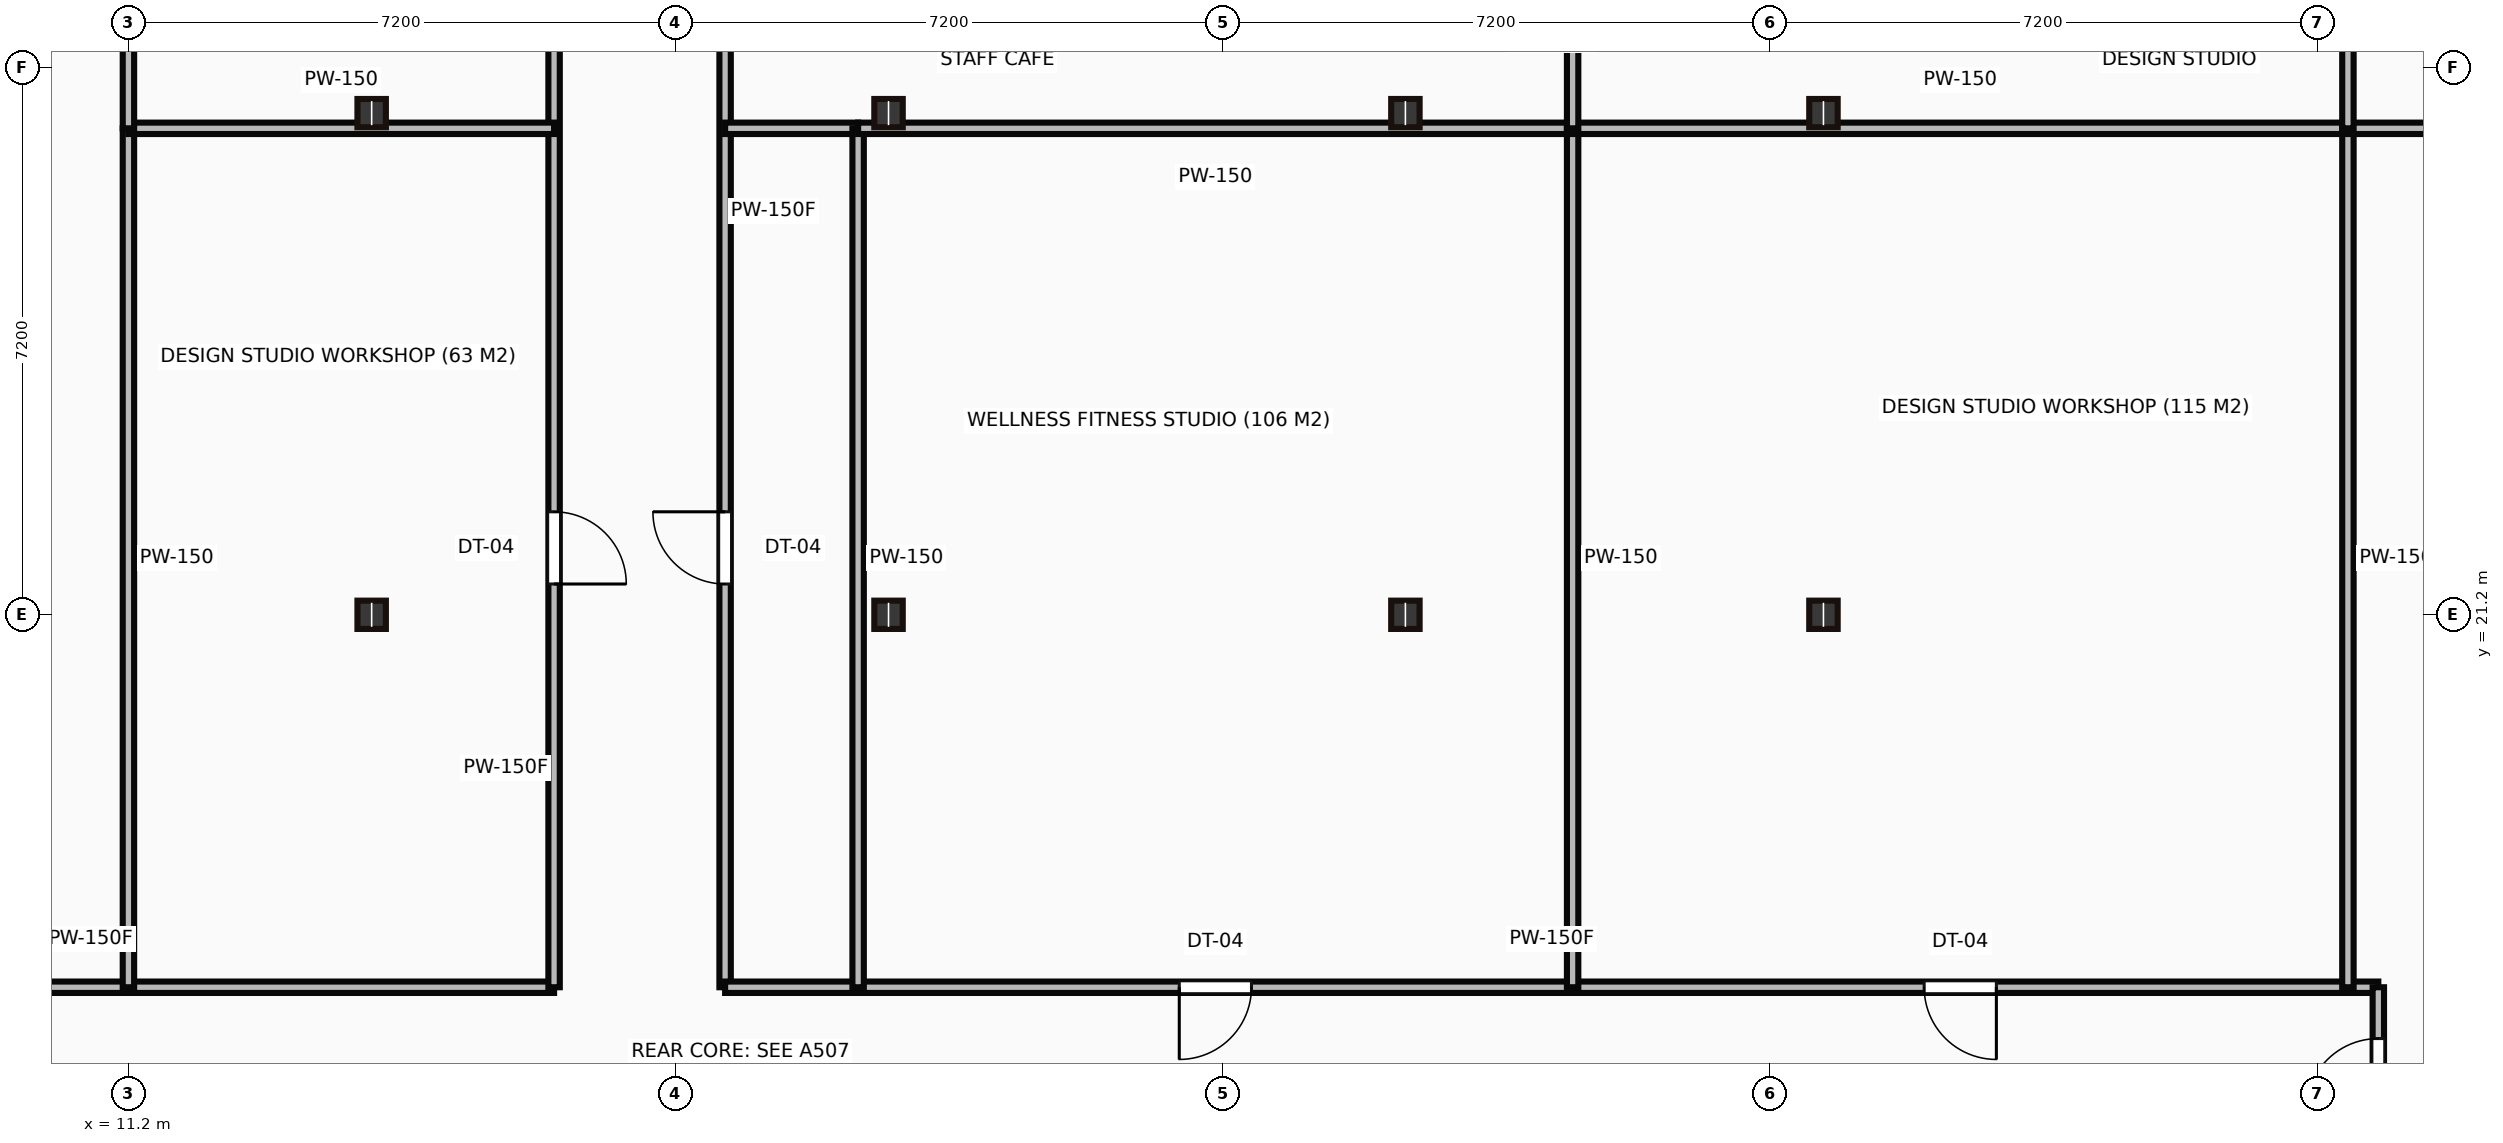
"""IFC4 building model, lengths in metres.
Left out: names, types, materials, properties, quantities, classifications, styles, units other than length and angle.
Written with IfcOpenShell. Run it as: python <this file> out.ifc"""

import sys

from ifc_helpers import new_model, si_unit, direction, frame, frame_2d, origin, origin_2d, place, context, subcontext, project, spatial, rectangle, i_section, extrude, source, transform, mapped, element, fill, save


model = new_model("IFC4")
c1 = context("Model", 3, precision=1e-05, world=origin(), true_north=direction((0.0, 1.0)))
c2 = subcontext(c1, "Body", "Model", "MODEL_VIEW")
j1 = project(units=[si_unit("LENGTHUNIT", "METRE"), si_unit("PLANEANGLEUNIT", "RADIAN")], contexts=[c1])
p1 = place(None, origin())
s1 = spatial("IfcSite", under=j1, at=p1, CompositionType="ELEMENT")
p2 = place(p1, origin())
s2 = spatial("IfcBuilding", under=s1, at=p2, CompositionType="ELEMENT")
p3 = place(p2, frame((0.0, 0.0, 173.45)))
s3 = spatial("IfcBuildingStorey", under=s2, at=p3, CompositionType="ELEMENT", Elevation=173.45)
m1 = source(origin(), c2, "Body", "SweptSolid", [
    extrude(i_section(OverallWidth=0.374, OverallDepth=0.372, WebThickness=0.016, FlangeThickness=0.026, at=origin_2d()), origin(), (0.0, 0.0, 1.0), 3.65),
])
for number, where, z_axis, x_axis in (
    (1, (14.4, 21.2, 0.0), (0.0, 0.0, 1.0), (1.0, 0.0, 0.0)),
    (2, (14.4, 27.8, 0.0), (0.0, 0.0, 1.0), (1.0, 0.0, 0.0)),
    (3, (21.2, 21.2, 0.0), (0.0, 0.0, 1.0), (1.0, 0.0, 0.0)),
    (4, (21.2, 27.8, 0.0), (0.0, 0.0, 1.0), (1.0, 0.0, 0.0)),
    (5, (28.0, 21.2, 0.0), (0.0, 0.0, 1.0), (1.0, 0.0, 0.0)),
    (6, (28.0, 27.8, 0.0), (0.0, 0.0, 1.0), (1.0, 0.0, 0.0)),
    (7, (33.5, 21.2, 0.0), (0.0, 0.0, 1.0), (1.0, 0.0, 0.0)),
    (8, (33.5, 27.8, 0.0), (0.0, 0.0, 1.0), (1.0, 0.0, 0.0)),
):
    element("IfcColumn", number, at=place(p3, frame(where, z_axis=z_axis, x_axis=x_axis)), inside=s3, PredefinedType="COLUMN", context=c2, shape_type="MappedRepresentation", body=[
        mapped(m1, transform((0.0, 0.0, 0.0))),
    ])
m2 = source(origin(), c2, "Body", "SweptSolid", [
    extrude(rectangle(XDim=12.2, YDim=0.15, at=frame_2d((6.1, 0.0))), origin(), (0.0, 0.0, 1.0), 3.4),
])
p4 = place(p3, frame((4.6, 16.3, 0.0), z_axis=(0.0, 0.0, 1.0), x_axis=(1.0, 0.0, 0.0)))
e9 = element("IfcWall", 9, at=p4, inside=s3, PredefinedType="PARTITIONING", context=c2, shape_type="MappedRepresentation", body=[
    mapped(m2, transform((0.0, 0.0, 0.0))),
])
p5 = place(p4, frame((2.955, 0.0, 0.0)))
e10 = element("IfcOpeningElement", 10, at=p5, cuts=e9, PredefinedType="OPENING", context=c2, shape_type="SweptSolid", body=[
    extrude(rectangle(XDim=0.95, YDim=2.15, at=frame_2d((0.475, 1.075))), frame((0.0, 0.085, 0.0), z_axis=(0.0, -1.0, 0.0), x_axis=(1.0, 0.0, 0.0)), (0.0, 0.0, 1.0), 0.17),
])
m3 = source(origin(), c2, "Body", "SweptSolid", [
    extrude(rectangle(XDim=13.1, YDim=0.15, at=frame_2d((6.55, 0.0))), origin(), (0.0, 0.0, 1.0), 3.4),
])
p6 = place(p3, frame((16.8, 16.3, 0.0), z_axis=(0.0, 0.0, 1.0), x_axis=(0.0, 1.0, 0.0)))
e11 = element("IfcWall", 11, at=p6, inside=s3, PredefinedType="PARTITIONING", context=c2, shape_type="MappedRepresentation", body=[
    mapped(m3, transform((0.0, 0.0, 0.0))),
])
p7 = place(p6, frame((5.305, 0.0, 0.0)))
e12 = element("IfcOpeningElement", 12, at=p7, cuts=e11, PredefinedType="OPENING", context=c2, shape_type="SweptSolid", body=[
    extrude(rectangle(XDim=0.95, YDim=2.15, at=frame_2d((0.475, 1.075))), frame((0.0, 0.085, 0.0), z_axis=(0.0, -1.0, 0.0), x_axis=(1.0, 0.0, 0.0)), (0.0, 0.0, 1.0), 0.17),
])
p8 = place(p3, frame((19.05, 29.4, 0.0), z_axis=(0.0, 0.0, 1.0), x_axis=(0.0, -1.0, 0.0)))
e13 = element("IfcWall", 13, at=p8, inside=s3, PredefinedType="PARTITIONING", context=c2, shape_type="MappedRepresentation", body=[
    mapped(m3, transform((0.0, 0.0, 0.0))),
])
p9 = place(p8, frame((6.845, 0.0, 0.0)))
e14 = element("IfcOpeningElement", 14, at=p9, cuts=e13, PredefinedType="OPENING", context=c2, shape_type="SweptSolid", body=[
    extrude(rectangle(XDim=0.95, YDim=2.15, at=frame_2d((0.475, 1.075))), frame((0.0, 0.085, 0.0), z_axis=(0.0, -1.0, 0.0), x_axis=(1.0, 0.0, 0.0)), (0.0, 0.0, 1.0), 0.17),
])
m4 = source(origin(), c2, "Body", "SweptSolid", [
    extrude(rectangle(XDim=21.75, YDim=0.15, at=frame_2d((10.875, 0.0))), origin(), (0.0, 0.0, 1.0), 3.4),
])
p10 = place(p3, frame((19.05, 16.3, 0.0), z_axis=(0.0, 0.0, 1.0), x_axis=(1.0, 0.0, 0.0)))
e15 = element("IfcWall", 15, at=p10, inside=s3, PredefinedType="PARTITIONING", context=c2, shape_type="MappedRepresentation", body=[
    mapped(m4, transform((0.0, 0.0, 0.0))),
])
p11 = place(p10, frame((5.975, 0.0, 0.0)))
e16 = element("IfcOpeningElement", 16, at=p11, cuts=e15, PredefinedType="OPENING", context=c2, shape_type="SweptSolid", body=[
    extrude(rectangle(XDim=0.95, YDim=2.15, at=frame_2d((0.475, 1.075))), frame((0.0, 0.085, 0.0), z_axis=(0.0, -1.0, 0.0), x_axis=(1.0, 0.0, 0.0)), (0.0, 0.0, 1.0), 0.17),
])
p12 = place(p10, frame((15.775, 0.0, 0.0)))
e17 = element("IfcOpeningElement", 17, at=p12, cuts=e15, PredefinedType="OPENING", context=c2, shape_type="SweptSolid", body=[
    extrude(rectangle(XDim=0.95, YDim=2.15, at=frame_2d((0.475, 1.075))), frame((0.0, 0.085, 0.0), z_axis=(0.0, -1.0, 0.0), x_axis=(1.0, 0.0, 0.0)), (0.0, 0.0, 1.0), 0.17),
])
m5 = source(origin(), c2, "Body", "SweptSolid", [
    extrude(rectangle(XDim=2.3, YDim=0.15, at=frame_2d((1.15, 0.0))), origin(), (0.0, 0.0, 1.0), 3.4),
])
p13 = place(p3, frame((40.8, 16.3, 0.0), z_axis=(0.0, 0.0, 1.0), x_axis=(0.0, -1.0, 0.0)))
e18 = element("IfcWall", 18, at=p13, inside=s3, PredefinedType="PARTITIONING", context=c2, shape_type="MappedRepresentation", body=[
    mapped(m5, transform((0.0, 0.0, 0.0))),
])
p14 = place(p13, frame((0.675, 0.0, 0.0)))
e19 = element("IfcOpeningElement", 19, at=p14, cuts=e18, PredefinedType="OPENING", context=c2, shape_type="SweptSolid", body=[
    extrude(rectangle(XDim=0.95, YDim=2.15, at=frame_2d((0.475, 1.075))), frame((0.0, 0.085, 0.0), z_axis=(0.0, -1.0, 0.0), x_axis=(1.0, 0.0, 0.0)), (0.0, 0.0, 1.0), 0.17),
])
m6 = source(origin(), c2, "Body", "SweptSolid", [
    extrude(rectangle(XDim=11.3, YDim=0.15, at=frame_2d((5.65, 0.0))), origin(), (0.0, 0.0, 1.0), 3.4),
])
p15 = place(p3, frame((11.2, 27.6, 0.0), z_axis=(0.0, 0.0, 1.0), x_axis=(0.0, -1.0, 0.0)))
e20 = element("IfcWall", 20, at=p15, inside=s3, PredefinedType="PARTITIONING", context=c2, shape_type="MappedRepresentation", body=[
    mapped(m6, transform((0.0, 0.0, 0.0))),
])
m7 = source(origin(), c2, "Body", "SweptSolid", [
    extrude(rectangle(XDim=5.6, YDim=0.15, at=frame_2d((2.8, 0.0))), origin(), (0.0, 0.0, 1.0), 3.4),
])
p16 = place(p3, frame((11.2, 27.6, 0.0), z_axis=(0.0, 0.0, 1.0), x_axis=(1.0, 0.0, 0.0)))
e21 = element("IfcWall", 21, at=p16, inside=s3, PredefinedType="PARTITIONING", context=c2, shape_type="MappedRepresentation", body=[
    mapped(m7, transform((0.0, 0.0, 0.0))),
])
m8 = source(origin(), c2, "Body", "SweptSolid", [
    extrude(rectangle(XDim=11.206, YDim=0.15, at=frame_2d((5.603, 0.0))), origin(), (0.0, 0.0, 1.0), 3.4),
])
p17 = place(p3, frame((11.2, 38.806, 0.0), z_axis=(0.0, 0.0, 1.0), x_axis=(0.0, -1.0, 0.0)))
e22 = element("IfcWall", 22, at=p17, inside=s3, PredefinedType="PARTITIONING", context=c2, shape_type="MappedRepresentation", body=[
    mapped(m8, transform((0.0, 0.0, 0.0))),
])
m9 = source(origin(), c2, "Body", "SweptSolid", [
    extrude(rectangle(XDim=1.75, YDim=0.15, at=frame_2d((0.875, 0.0))), origin(), (0.0, 0.0, 1.0), 3.4),
])
p18 = place(p3, frame((19.05, 27.6, 0.0), z_axis=(0.0, 0.0, 1.0), x_axis=(1.0, 0.0, 0.0)))
e23 = element("IfcWall", 23, at=p18, inside=s3, PredefinedType="PARTITIONING", context=c2, shape_type="MappedRepresentation", body=[
    mapped(m9, transform((0.0, 0.0, 0.0))),
])
p19 = place(p3, frame((20.8, 27.6, 0.0), z_axis=(0.0, 0.0, 1.0), x_axis=(0.0, -1.0, 0.0)))
e24 = element("IfcWall", 24, at=p19, inside=s3, PredefinedType="PARTITIONING", context=c2, shape_type="MappedRepresentation", body=[
    mapped(m6, transform((0.0, 0.0, 0.0))),
])
m10 = source(origin(), c2, "Body", "SweptSolid", [
    extrude(rectangle(XDim=9.4, YDim=0.15, at=frame_2d((4.7, 0.0))), origin(), (0.0, 0.0, 1.0), 3.4),
])
p20 = place(p3, frame((30.2, 27.6, 0.0), z_axis=(0.0, 0.0, 1.0), x_axis=(-1.0, 0.0, 0.0)))
e25 = element("IfcWall", 25, at=p20, inside=s3, PredefinedType="PARTITIONING", context=c2, shape_type="MappedRepresentation", body=[
    mapped(m10, transform((0.0, 0.0, 0.0))),
])
p21 = place(p3, frame((30.2, 27.6, 0.0), z_axis=(0.0, 0.0, 1.0), x_axis=(0.0, -1.0, 0.0)))
e26 = element("IfcWall", 26, at=p21, inside=s3, PredefinedType="PARTITIONING", context=c2, shape_type="MappedRepresentation", body=[
    mapped(m6, transform((0.0, 0.0, 0.0))),
])
m11 = source(origin(), c2, "Body", "SweptSolid", [
    extrude(rectangle(XDim=10.2, YDim=0.15, at=frame_2d((5.1, 0.0))), origin(), (0.0, 0.0, 1.0), 3.4),
])
p22 = place(p3, frame((30.2, 27.6, 0.0), z_axis=(0.0, 0.0, 1.0), x_axis=(1.0, 0.0, 0.0)))
e27 = element("IfcWall", 27, at=p22, inside=s3, PredefinedType="PARTITIONING", context=c2, shape_type="MappedRepresentation", body=[
    mapped(m11, transform((0.0, 0.0, 0.0))),
])
m12 = source(origin(), c2, "Body", "SweptSolid", [
    extrude(rectangle(XDim=1.8, YDim=0.15, at=frame_2d((0.9, 0.0))), origin(), (0.0, 0.0, 1.0), 3.4),
])
p23 = place(p3, frame((30.2, 29.4, 0.0), z_axis=(0.0, 0.0, 1.0), x_axis=(0.0, -1.0, 0.0)))
e28 = element("IfcWall", 28, at=p23, inside=s3, PredefinedType="PARTITIONING", context=c2, shape_type="MappedRepresentation", body=[
    mapped(m12, transform((0.0, 0.0, 0.0))),
])
p24 = place(p3, frame((40.4, 27.6, 0.0), z_axis=(0.0, 0.0, 1.0), x_axis=(0.0, -1.0, 0.0)))
e29 = element("IfcWall", 29, at=p24, inside=s3, PredefinedType="PARTITIONING", context=c2, shape_type="MappedRepresentation", body=[
    mapped(m6, transform((0.0, 0.0, 0.0))),
])
m13 = source(origin(), c2, "Body", "SweptSolid", [
    extrude(rectangle(XDim=9.58, YDim=0.15, at=frame_2d((4.79, 0.0))), origin(), (0.0, 0.0, 1.0), 3.4),
])
p25 = place(p3, frame((40.4, 27.6, 0.0), z_axis=(0.0, 0.0, 1.0), x_axis=(1.0, 0.0, 0.0)))
e30 = element("IfcWall", 30, at=p25, inside=s3, PredefinedType="PARTITIONING", context=c2, shape_type="MappedRepresentation", body=[
    mapped(m13, transform((0.0, 0.0, 0.0))),
])
p26 = place(p3, frame((40.4, 29.4, 0.0), z_axis=(0.0, 0.0, 1.0), x_axis=(0.0, -1.0, 0.0)))
e31 = element("IfcWall", 31, at=p26, inside=s3, PredefinedType="PARTITIONING", context=c2, shape_type="MappedRepresentation", body=[
    mapped(m12, transform((0.0, 0.0, 0.0))),
])
m14 = source(origin(), c2, "Body", "SweptSolid", [
    extrude(rectangle(XDim=0.95, YDim=2.15, at=frame_2d((0.475, 1.075))), frame((0.0, 0.025, 0.0), z_axis=(0.0, -1.0, 0.0), x_axis=(1.0, 0.0, 0.0)), (0.0, 0.0, 1.0), 0.05),
])
p27 = place(p7, origin())
e32 = element("IfcDoor", 32, at=p27, inside=s3, OperationType="SINGLE_SWING_LEFT", PredefinedType="DOOR", context=c2, shape_type="MappedRepresentation", body=[
    mapped(m14, transform((0.0, 0.0, 0.0))),
])
fill(e12, e32)
p28 = place(p9, origin())
e33 = element("IfcDoor", 33, at=p28, inside=s3, OperationType="SINGLE_SWING_LEFT", PredefinedType="DOOR", context=c2, shape_type="MappedRepresentation", body=[
    mapped(m14, transform((0.0, 0.0, 0.0))),
])
fill(e14, e33)
p29 = place(p11, origin())
e34 = element("IfcDoor", 34, at=p29, inside=s3, OperationType="SINGLE_SWING_LEFT", PredefinedType="DOOR", context=c2, shape_type="MappedRepresentation", body=[
    mapped(m14, transform((0.0, 0.0, 0.0))),
])
fill(e16, e34)
p30 = place(p12, origin())
e35 = element("IfcDoor", 35, at=p30, inside=s3, OperationType="SINGLE_SWING_RIGHT", PredefinedType="DOOR", context=c2, shape_type="MappedRepresentation", body=[
    mapped(m14, transform((0.0, 0.0, 0.0))),
])
fill(e17, e35)
p31 = place(p14, origin())
e36 = element("IfcDoor", 36, at=p31, inside=s3, OperationType="SINGLE_SWING_RIGHT", PredefinedType="DOOR", context=c2, shape_type="MappedRepresentation", body=[
    mapped(m14, transform((0.0, 0.0, 0.0))),
])
fill(e19, e36)
save(model, sys.argv[1])
